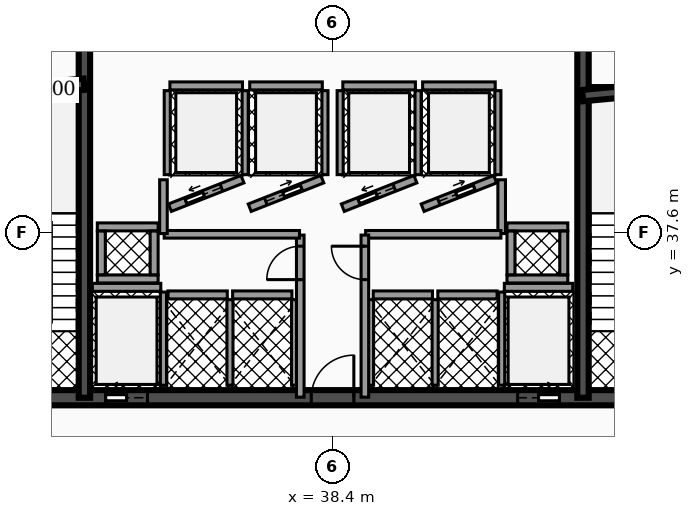
"""IFC4 building model, lengths in metres.
Left out: names, types, materials, properties, quantities, classifications, styles, units other than length and angle.
Written with IfcOpenShell. Run it as: python <this file> out.ifc"""

import sys

from ifc_helpers import new_model, si_unit, direction, frame, frame_2d, origin, place, context, subcontext, project, spatial, rectangle, extrude, element, fill, save


model = new_model("IFC4")
c1 = context("Model", 3, precision=1e-05, world=origin(), true_north=direction((0.0, 1.0)))
c2 = subcontext(c1, "Body", "Model", "MODEL_VIEW")
j1 = project(units=[si_unit("LENGTHUNIT", "METRE"), si_unit("PLANEANGLEUNIT", "RADIAN")], contexts=[c1])
p1 = place(None, origin())
s1 = spatial("IfcSite", under=j1, at=p1, CompositionType="ELEMENT")
p2 = place(p1, origin())
s2 = spatial("IfcBuilding", under=s1, at=p2, CompositionType="ELEMENT")
p3 = place(p2, frame((0.0, 0.0, 60.18)))
s3 = spatial("IfcBuildingStorey", under=s2, at=p3, CompositionType="ELEMENT", Elevation=60.18)
p4 = place(p3, frame((28.4, 33.25, 0.0), z_axis=(0.0, 0.0, 1.0), x_axis=(1.0, 0.0, 0.0)))
e1 = element("IfcWall", 1, at=p4, inside=s3, PredefinedType="SHEAR", context=c2, shape_type="SweptSolid", body=[
    extrude(rectangle(XDim=20.06, YDim=0.4, at=frame_2d((10.03, 0.0))), origin(), (0.0, 0.0, 1.0), 3.82),
])
p5 = place(p4, frame((4.03, 0.0, 0.0)))
e2 = element("IfcOpeningElement", 2, at=p5, cuts=e1, PredefinedType="OPENING", context=c2, shape_type="SweptSolid", body=[
    extrude(rectangle(XDim=1.1, YDim=2.15, at=frame_2d((0.55, 1.075))), frame((0.0, 0.21, 0.0), z_axis=(0.0, -1.0, 0.0), x_axis=(1.0, 0.0, 0.0)), (0.0, 0.0, 1.0), 0.42),
])
p6 = place(p4, frame((14.87, 0.0, 0.0)))
e3 = element("IfcOpeningElement", 3, at=p6, cuts=e1, PredefinedType="OPENING", context=c2, shape_type="SweptSolid", body=[
    extrude(rectangle(XDim=1.1, YDim=2.15, at=frame_2d((0.55, 1.075))), frame((0.0, 0.21, 0.0), z_axis=(0.0, -1.0, 0.0), x_axis=(1.0, 0.0, 0.0)), (0.0, 0.0, 1.0), 0.42),
])
p7 = place(p4, frame((1.31, 0.0, 0.0)))
e4 = element("IfcOpeningElement", 4, at=p7, cuts=e1, PredefinedType="OPENING", context=c2, shape_type="SweptSolid", body=[
    extrude(rectangle(XDim=1.1, YDim=2.2, at=frame_2d((0.55, 1.1))), frame((0.0, 0.21, 0.0), z_axis=(0.0, -1.0, 0.0), x_axis=(1.0, 0.0, 0.0)), (0.0, 0.0, 1.0), 0.42),
])
p8 = place(p4, frame((9.44, 0.0, 0.0)))
e5 = element("IfcOpeningElement", 5, at=p8, cuts=e1, PredefinedType="OPENING", context=c2, shape_type="SweptSolid", body=[
    extrude(rectangle(XDim=1.12, YDim=2.05, at=frame_2d((0.56, 1.025))), frame((0.0, 0.21, 0.0), z_axis=(0.0, -1.0, 0.0), x_axis=(1.0, 0.0, 0.0)), (0.0, 0.0, 1.0), 0.42),
])
p9 = place(p4, frame((17.65, 0.0, 0.0)))
e6 = element("IfcOpeningElement", 6, at=p9, cuts=e1, PredefinedType="OPENING", context=c2, shape_type="SweptSolid", body=[
    extrude(rectangle(XDim=1.1, YDim=2.2, at=frame_2d((0.55, 1.1))), frame((0.0, 0.21, 0.0), z_axis=(0.0, -1.0, 0.0), x_axis=(1.0, 0.0, 0.0)), (0.0, 0.0, 1.0), 0.42),
])
for number, where, z_axis, x_axis in (
    (7, (31.87, 33.25, 0.0), (0.0, 0.0, 1.0), (0.0, 1.0, 0.0)),
    (8, (44.99, 33.25, 0.0), (0.0, 0.0, 1.0), (0.0, 1.0, 0.0)),
):
    element("IfcWall", number, at=place(p3, frame(where, z_axis=z_axis, x_axis=x_axis)), inside=s3, PredefinedType="SHEAR", context=c2, shape_type="SweptSolid", body=[
        extrude(rectangle(XDim=10.2, YDim=0.3, at=frame_2d((5.1, 0.0))), origin(), (0.0, 0.0, 1.0), 3.82),
    ])
p10 = place(p3, frame((28.64, 41.2, 0.0), z_axis=(0.0, 0.0, 1.0), x_axis=(0.995687118776, 0.092774789157, 0.0)))
e9 = element("IfcWall", 9, at=p10, inside=s3, PredefinedType="SHEAR", context=c2, shape_type="SweptSolid", body=[
    extrude(rectangle(XDim=3.234, YDim=0.3, at=frame_2d((1.617, 0.0))), origin(), (0.0, 0.0, 1.0), 3.82),
])
p11 = place(p3, frame((44.98, 41.2, 0.0), z_axis=(0.0, 0.0, 1.0), x_axis=(0.995686468965, 0.09278176286, 0.0)))
e10 = element("IfcWall", 10, at=p11, inside=s3, PredefinedType="SHEAR", context=c2, shape_type="SweptSolid", body=[
    extrude(rectangle(XDim=3.234, YDim=0.3, at=frame_2d((1.617, 0.0))), origin(), (0.0, 0.0, 1.0), 3.82),
])
p12 = place(p3, frame((32.08, 36.155, 0.0), z_axis=(0.0, 0.0, 1.0), x_axis=(1.0, 0.0, 0.0)))
e11 = element("IfcWall", 11, at=p12, inside=s3, PredefinedType="SOLIDWALL", context=c2, shape_type="SweptSolid", body=[
    extrude(rectangle(XDim=1.8, YDim=0.21, at=frame_2d((0.9, 0.0))), origin(), (0.0, 0.0, 1.0), 2.792),
])
p13 = place(p3, frame((33.95, 33.58, 0.0), z_axis=(0.0, 0.0, 1.0), x_axis=(0.0, 1.0, 0.0)))
e12 = element("IfcWall", 12, at=p13, inside=s3, PredefinedType="SOLIDWALL", context=c2, shape_type="SweptSolid", body=[
    extrude(rectangle(XDim=2.45, YDim=0.16, at=frame_2d((1.225, 0.0))), origin(), (0.0, 0.0, 1.0), 2.792),
])
p14 = place(p3, frame((42.92, 36.155, 0.0), z_axis=(0.0, 0.0, 1.0), x_axis=(1.0, 0.0, 0.0)))
e13 = element("IfcWall", 13, at=p14, inside=s3, PredefinedType="SOLIDWALL", context=c2, shape_type="SweptSolid", body=[
    extrude(rectangle(XDim=1.8, YDim=0.21, at=frame_2d((0.9, 0.0))), origin(), (0.0, 0.0, 1.0), 2.792),
])
p15 = place(p3, frame((42.85, 33.58, 0.0), z_axis=(0.0, 0.0, 1.0), x_axis=(0.0, 1.0, 0.0)))
e14 = element("IfcWall", 14, at=p15, inside=s3, PredefinedType="SOLIDWALL", context=c2, shape_type="SweptSolid", body=[
    extrude(rectangle(XDim=2.45, YDim=0.16, at=frame_2d((1.225, 0.0))), origin(), (0.0, 0.0, 1.0), 2.792),
])
p16 = place(p3, frame((34.12, 38.25, 0.0), z_axis=(0.0, 0.0, 1.0), x_axis=(0.930804993012, 0.36551616241, 0.0)))
e15 = element("IfcWall", 15, at=p16, inside=s3, PredefinedType="SOLIDWALL", context=c2, shape_type="SweptSolid", body=[
    extrude(rectangle(XDim=2.052, YDim=0.21, at=frame_2d((1.026, 0.0))), origin(), (0.0, 0.0, 1.0), 2.792),
])
p17 = place(p16, frame((0.455, 0.0, 0.0)))
e16 = element("IfcOpeningElement", 16, at=p17, cuts=e15, PredefinedType="OPENING", context=c2, shape_type="SweptSolid", body=[
    extrude(rectangle(XDim=1.0, YDim=2.1, at=frame_2d((0.5, 1.05))), frame((0.0, 0.115, 0.0), z_axis=(0.0, -1.0, 0.0), x_axis=(1.0, 0.0, 0.0)), (0.0, 0.0, 1.0), 0.23),
])
p18 = place(p3, frame((34.12, 41.455, 0.0), z_axis=(0.0, 0.0, 1.0), x_axis=(1.0, 0.0, 0.0)))
e17 = element("IfcWall", 17, at=p18, inside=s3, PredefinedType="SOLIDWALL", context=c2, shape_type="SweptSolid", body=[
    extrude(rectangle(XDim=1.91, YDim=0.21, at=frame_2d((0.955, 0.0))), origin(), (0.0, 0.0, 1.0), 2.792),
])
for number, where, z_axis, x_axis in (
    (18, (34.05, 39.12, 0.0), (0.0, 0.0, 1.0), (0.0, 1.0, 0.0)),
    (19, (36.1, 39.12, 0.0), (0.0, 0.0, 1.0), (0.0, 1.0, 0.0)),
):
    element("IfcWall", number, at=place(p3, frame(where, z_axis=z_axis, x_axis=x_axis)), inside=s3, PredefinedType="SOLIDWALL", context=c2, shape_type="SweptSolid", body=[
        extrude(rectangle(XDim=2.21, YDim=0.16, at=frame_2d((1.105, 0.0))), origin(), (0.0, 0.0, 1.0), 2.792),
    ])
p19 = place(p3, frame((36.22, 38.25, 0.0), z_axis=(0.0, 0.0, 1.0), x_axis=(0.930804993012, 0.36551616241, 0.0)))
e20 = element("IfcWall", 20, at=p19, inside=s3, PredefinedType="SOLIDWALL", context=c2, shape_type="SweptSolid", body=[
    extrude(rectangle(XDim=2.052, YDim=0.21, at=frame_2d((1.026, 0.0))), origin(), (0.0, 0.0, 1.0), 2.792),
])
p20 = place(p19, frame((0.455, 0.0, 0.0)))
e21 = element("IfcOpeningElement", 21, at=p20, cuts=e20, PredefinedType="OPENING", context=c2, shape_type="SweptSolid", body=[
    extrude(rectangle(XDim=1.0, YDim=2.1, at=frame_2d((0.5, 1.05))), frame((0.0, 0.115, 0.0), z_axis=(0.0, -1.0, 0.0), x_axis=(1.0, 0.0, 0.0)), (0.0, 0.0, 1.0), 0.23),
])
p21 = place(p3, frame((36.22, 41.455, 0.0), z_axis=(0.0, 0.0, 1.0), x_axis=(1.0, 0.0, 0.0)))
e22 = element("IfcWall", 22, at=p21, inside=s3, PredefinedType="SOLIDWALL", context=c2, shape_type="SweptSolid", body=[
    extrude(rectangle(XDim=1.91, YDim=0.21, at=frame_2d((0.955, 0.0))), origin(), (0.0, 0.0, 1.0), 2.792),
])
p22 = place(p3, frame((38.2, 39.12, 0.0), z_axis=(0.0, 0.0, 1.0), x_axis=(0.0, 1.0, 0.0)))
e23 = element("IfcWall", 23, at=p22, inside=s3, PredefinedType="SOLIDWALL", context=c2, shape_type="SweptSolid", body=[
    extrude(rectangle(XDim=2.21, YDim=0.16, at=frame_2d((1.105, 0.0))), origin(), (0.0, 0.0, 1.0), 2.792),
])
p23 = place(p3, frame((38.67, 38.25, 0.0), z_axis=(0.0, 0.0, 1.0), x_axis=(0.930820886763, 0.3654756856, 0.0)))
e24 = element("IfcWall", 24, at=p23, inside=s3, PredefinedType="SOLIDWALL", context=c2, shape_type="SweptSolid", body=[
    extrude(rectangle(XDim=2.052, YDim=0.21, at=frame_2d((1.026, 0.0))), origin(), (0.0, 0.0, 1.0), 2.792),
])
p24 = place(p23, frame((0.455, 0.0, 0.0)))
e25 = element("IfcOpeningElement", 25, at=p24, cuts=e24, PredefinedType="OPENING", context=c2, shape_type="SweptSolid", body=[
    extrude(rectangle(XDim=1.0, YDim=2.1, at=frame_2d((0.5, 1.05))), frame((0.0, 0.115, 0.0), z_axis=(0.0, -1.0, 0.0), x_axis=(1.0, 0.0, 0.0)), (0.0, 0.0, 1.0), 0.23),
])
p25 = place(p3, frame((38.67, 41.455, 0.0), z_axis=(0.0, 0.0, 1.0), x_axis=(1.0, 0.0, 0.0)))
e26 = element("IfcWall", 26, at=p25, inside=s3, PredefinedType="SOLIDWALL", context=c2, shape_type="SweptSolid", body=[
    extrude(rectangle(XDim=1.91, YDim=0.21, at=frame_2d((0.955, 0.0))), origin(), (0.0, 0.0, 1.0), 2.792),
])
for number, where, z_axis, x_axis in (
    (27, (38.6, 39.12, 0.0), (0.0, 0.0, 1.0), (0.0, 1.0, 0.0)),
    (28, (40.65, 39.12, 0.0), (0.0, 0.0, 1.0), (0.0, 1.0, 0.0)),
):
    element("IfcWall", number, at=place(p3, frame(where, z_axis=z_axis, x_axis=x_axis)), inside=s3, PredefinedType="SOLIDWALL", context=c2, shape_type="SweptSolid", body=[
        extrude(rectangle(XDim=2.21, YDim=0.16, at=frame_2d((1.105, 0.0))), origin(), (0.0, 0.0, 1.0), 2.792),
    ])
p26 = place(p3, frame((40.77, 38.25, 0.0), z_axis=(0.0, 0.0, 1.0), x_axis=(0.930804993012, 0.36551616241, 0.0)))
e29 = element("IfcWall", 29, at=p26, inside=s3, PredefinedType="SOLIDWALL", context=c2, shape_type="SweptSolid", body=[
    extrude(rectangle(XDim=2.052, YDim=0.21, at=frame_2d((1.026, 0.0))), origin(), (0.0, 0.0, 1.0), 2.792),
])
p27 = place(p26, frame((0.455, 0.0, 0.0)))
e30 = element("IfcOpeningElement", 30, at=p27, cuts=e29, PredefinedType="OPENING", context=c2, shape_type="SweptSolid", body=[
    extrude(rectangle(XDim=1.0, YDim=2.1, at=frame_2d((0.5, 1.05))), frame((0.0, 0.115, 0.0), z_axis=(0.0, -1.0, 0.0), x_axis=(1.0, 0.0, 0.0)), (0.0, 0.0, 1.0), 0.23),
])
p28 = place(p3, frame((40.77, 41.455, 0.0), z_axis=(0.0, 0.0, 1.0), x_axis=(1.0, 0.0, 0.0)))
e31 = element("IfcWall", 31, at=p28, inside=s3, PredefinedType="SOLIDWALL", context=c2, shape_type="SweptSolid", body=[
    extrude(rectangle(XDim=1.91, YDim=0.21, at=frame_2d((0.955, 0.0))), origin(), (0.0, 0.0, 1.0), 2.792),
])
p29 = place(p3, frame((42.75, 39.12, 0.0), z_axis=(0.0, 0.0, 1.0), x_axis=(0.0, 1.0, 0.0)))
e32 = element("IfcWall", 32, at=p29, inside=s3, PredefinedType="SOLIDWALL", context=c2, shape_type="SweptSolid", body=[
    extrude(rectangle(XDim=2.21, YDim=0.16, at=frame_2d((1.105, 0.0))), origin(), (0.0, 0.0, 1.0), 2.792),
])
p30 = place(p3, frame((34.07, 35.955, 0.0), z_axis=(0.0, 0.0, 1.0), x_axis=(1.0, 0.0, 0.0)))
e33 = element("IfcWall", 33, at=p30, inside=s3, PredefinedType="SOLIDWALL", context=c2, shape_type="SweptSolid", body=[
    extrude(rectangle(XDim=1.56, YDim=0.21, at=frame_2d((0.78, 0.0))), origin(), (0.0, 0.0, 1.0), 2.792),
])
p31 = place(p3, frame((35.7, 33.58, 0.0), z_axis=(0.0, 0.0, 1.0), x_axis=(0.0, 1.0, 0.0)))
e34 = element("IfcWall", 34, at=p31, inside=s3, PredefinedType="SOLIDWALL", context=c2, shape_type="SweptSolid", body=[
    extrude(rectangle(XDim=2.25, YDim=0.16, at=frame_2d((1.125, 0.0))), origin(), (0.0, 0.0, 1.0), 2.792),
])
p32 = place(p3, frame((35.77, 35.955, 0.0), z_axis=(0.0, 0.0, 1.0), x_axis=(1.0, 0.0, 0.0)))
e35 = element("IfcWall", 35, at=p32, inside=s3, PredefinedType="SOLIDWALL", context=c2, shape_type="SweptSolid", body=[
    extrude(rectangle(XDim=1.56, YDim=0.21, at=frame_2d((0.78, 0.0))), origin(), (0.0, 0.0, 1.0), 2.792),
])
p33 = place(p3, frame((37.4, 33.58, 0.0), z_axis=(0.0, 0.0, 1.0), x_axis=(0.0, 1.0, 0.0)))
e36 = element("IfcWall", 36, at=p33, inside=s3, PredefinedType="SOLIDWALL", context=c2, shape_type="SweptSolid", body=[
    extrude(rectangle(XDim=2.25, YDim=0.16, at=frame_2d((1.125, 0.0))), origin(), (0.0, 0.0, 1.0), 2.792),
])
p34 = place(p3, frame((39.47, 35.955, 0.0), z_axis=(0.0, 0.0, 1.0), x_axis=(1.0, 0.0, 0.0)))
e37 = element("IfcWall", 37, at=p34, inside=s3, PredefinedType="SOLIDWALL", context=c2, shape_type="SweptSolid", body=[
    extrude(rectangle(XDim=1.56, YDim=0.21, at=frame_2d((0.78, 0.0))), origin(), (0.0, 0.0, 1.0), 2.792),
])
for number, where, z_axis, x_axis in (
    (38, (39.4, 33.58, 0.0), (0.0, 0.0, 1.0), (0.0, 1.0, 0.0)),
    (39, (41.1, 33.58, 0.0), (0.0, 0.0, 1.0), (0.0, 1.0, 0.0)),
):
    element("IfcWall", number, at=place(p3, frame(where, z_axis=z_axis, x_axis=x_axis)), inside=s3, PredefinedType="SOLIDWALL", context=c2, shape_type="SweptSolid", body=[
        extrude(rectangle(XDim=2.25, YDim=0.16, at=frame_2d((1.125, 0.0))), origin(), (0.0, 0.0, 1.0), 2.792),
    ])
p35 = place(p3, frame((41.17, 35.955, 0.0), z_axis=(0.0, 0.0, 1.0), x_axis=(1.0, 0.0, 0.0)))
e40 = element("IfcWall", 40, at=p35, inside=s3, PredefinedType="SOLIDWALL", context=c2, shape_type="SweptSolid", body=[
    extrude(rectangle(XDim=1.56, YDim=0.21, at=frame_2d((0.78, 0.0))), origin(), (0.0, 0.0, 1.0), 2.792),
])
for number, where, z_axis, x_axis in (
    (41, (32.21, 36.375, 0.0), (0.0, 0.0, 1.0), (1.0, 0.0, 0.0)),
    (42, (32.21, 37.745, 0.0), (0.0, 0.0, 1.0), (1.0, 0.0, 0.0)),
):
    element("IfcWall", number, at=place(p3, frame(where, z_axis=z_axis, x_axis=x_axis)), inside=s3, PredefinedType="SOLIDWALL", context=c2, shape_type="SweptSolid", body=[
        extrude(rectangle(XDim=1.6, YDim=0.21, at=frame_2d((0.8, 0.0))), origin(), (0.0, 0.0, 1.0), 3.82),
    ])
for number, where, z_axis, x_axis in (
    (43, (32.315, 36.485, 0.0), (0.0, 0.0, 1.0), (0.0, 1.0, 0.0)),
    (44, (33.705, 36.485, 0.0), (0.0, 0.0, 1.0), (0.0, 1.0, 0.0)),
):
    element("IfcWall", number, at=place(p3, frame(where, z_axis=z_axis, x_axis=x_axis)), inside=s3, PredefinedType="SOLIDWALL", context=c2, shape_type="SweptSolid", body=[
        extrude(rectangle(XDim=1.15, YDim=0.21, at=frame_2d((0.575, 0.0))), origin(), (0.0, 0.0, 1.0), 3.82),
    ])
for number, where, z_axis, x_axis in (
    (45, (42.99, 36.375, 0.0), (0.0, 0.0, 1.0), (1.0, 0.0, 0.0)),
    (46, (42.99, 37.745, 0.0), (0.0, 0.0, 1.0), (1.0, 0.0, 0.0)),
):
    element("IfcWall", number, at=place(p3, frame(where, z_axis=z_axis, x_axis=x_axis)), inside=s3, PredefinedType="SOLIDWALL", context=c2, shape_type="SweptSolid", body=[
        extrude(rectangle(XDim=1.6, YDim=0.21, at=frame_2d((0.8, 0.0))), origin(), (0.0, 0.0, 1.0), 3.82),
    ])
for number, where, z_axis, x_axis in (
    (47, (43.095, 36.485, 0.0), (0.0, 0.0, 1.0), (0.0, 1.0, 0.0)),
    (48, (44.485, 36.485, 0.0), (0.0, 0.0, 1.0), (0.0, 1.0, 0.0)),
):
    element("IfcWall", number, at=place(p3, frame(where, z_axis=z_axis, x_axis=x_axis)), inside=s3, PredefinedType="SOLIDWALL", context=c2, shape_type="SweptSolid", body=[
        extrude(rectangle(XDim=1.15, YDim=0.21, at=frame_2d((0.575, 0.0))), origin(), (0.0, 0.0, 1.0), 3.82),
    ])
p36 = place(p3, frame((37.55, 33.265, 0.0), z_axis=(0.0, 0.0, 1.0), x_axis=(0.0, 1.0, 0.0)))
e49 = element("IfcWall", 49, at=p36, inside=s3, PredefinedType="PARTITIONING", context=c2, shape_type="SweptSolid", body=[
    extrude(rectangle(XDim=4.265, YDim=0.2, at=frame_2d((2.133, 0.0))), origin(), (0.0, 0.0, 1.0), 2.777),
])
p37 = place(p36, frame((3.093, 0.0, 0.0)))
e50 = element("IfcOpeningElement", 50, at=p37, cuts=e49, PredefinedType="OPENING", context=c2, shape_type="SweptSolid", body=[
    extrude(rectangle(XDim=0.88, YDim=2.05, at=frame_2d((0.44, 1.025))), frame((0.0, 0.11, 0.0), z_axis=(0.0, -1.0, 0.0), x_axis=(1.0, 0.0, 0.0)), (0.0, 0.0, 1.0), 0.22),
])
p38 = place(p3, frame((33.97, 37.55, 0.0), z_axis=(0.0, 0.0, 1.0), x_axis=(1.0, 0.0, 0.0)))
e51 = element("IfcWall", 51, at=p38, inside=s3, PredefinedType="PARTITIONING", context=c2, shape_type="SweptSolid", body=[
    extrude(rectangle(XDim=3.56, YDim=0.2, at=frame_2d((1.78, 0.0))), origin(), (0.0, 0.0, 1.0), 2.777),
])
for number, where, z_axis, x_axis in (
    (52, (33.95, 37.57, 0.0), (0.0, 0.0, 1.0), (0.0, 1.0, 0.0)),
    (53, (42.85, 37.57, 0.0), (0.0, 0.0, 1.0), (0.0, 1.0, 0.0)),
):
    element("IfcWall", number, at=place(p3, frame(where, z_axis=z_axis, x_axis=x_axis)), inside=s3, PredefinedType="PARTITIONING", context=c2, shape_type="SweptSolid", body=[
        extrude(rectangle(XDim=1.415, YDim=0.2, at=frame_2d((0.708, 0.0))), origin(), (0.0, 0.0, 1.0), 2.777),
    ])
p39 = place(p3, frame((39.27, 37.55, 0.0), z_axis=(0.0, 0.0, 1.0), x_axis=(1.0, 0.0, 0.0)))
e54 = element("IfcWall", 54, at=p39, inside=s3, PredefinedType="PARTITIONING", context=c2, shape_type="SweptSolid", body=[
    extrude(rectangle(XDim=3.56, YDim=0.2, at=frame_2d((1.78, 0.0))), origin(), (0.0, 0.0, 1.0), 2.777),
])
p40 = place(p3, frame((39.25, 33.265, 0.0), z_axis=(0.0, 0.0, 1.0), x_axis=(0.0, 1.0, 0.0)))
e55 = element("IfcWall", 55, at=p40, inside=s3, PredefinedType="PARTITIONING", context=c2, shape_type="SweptSolid", body=[
    extrude(rectangle(XDim=4.265, YDim=0.2, at=frame_2d((2.133, 0.0))), origin(), (0.0, 0.0, 1.0), 2.777),
])
p41 = place(p40, frame((3.093, 0.0, 0.0)))
e56 = element("IfcOpeningElement", 56, at=p41, cuts=e55, PredefinedType="OPENING", context=c2, shape_type="SweptSolid", body=[
    extrude(rectangle(XDim=0.88, YDim=2.05, at=frame_2d((0.44, 1.025))), frame((0.0, 0.11, 0.0), z_axis=(0.0, -1.0, 0.0), x_axis=(1.0, 0.0, 0.0)), (0.0, 0.0, 1.0), 0.22),
])
p42 = place(p5, origin())
e57 = element("IfcDoor", 57, at=p42, inside=s3, OperationType="SLIDING_TO_LEFT", PredefinedType="DOOR", context=c2, shape_type="SweptSolid", body=[
    extrude(rectangle(XDim=1.1, YDim=2.15, at=frame_2d((0.55, 1.075))), frame((0.0, 0.025, 0.0), z_axis=(0.0, -1.0, 0.0), x_axis=(1.0, 0.0, 0.0)), (0.0, 0.0, 1.0), 0.05),
])
fill(e2, e57)
p43 = place(p6, origin())
e58 = element("IfcDoor", 58, at=p43, inside=s3, OperationType="SLIDING_TO_RIGHT", PredefinedType="DOOR", context=c2, shape_type="SweptSolid", body=[
    extrude(rectangle(XDim=1.1, YDim=2.15, at=frame_2d((0.55, 1.075))), frame((0.0, 0.025, 0.0), z_axis=(0.0, -1.0, 0.0), x_axis=(1.0, 0.0, 0.0)), (0.0, 0.0, 1.0), 0.05),
])
fill(e3, e58)
p44 = place(p17, origin())
e59 = element("IfcDoor", 59, at=p44, inside=s3, OperationType="SLIDING_TO_LEFT", PredefinedType="DOOR", context=c2, shape_type="SweptSolid", body=[
    extrude(rectangle(XDim=1.0, YDim=2.1, at=frame_2d((0.5, 1.05))), frame((0.0, 0.025, 0.0), z_axis=(0.0, -1.0, 0.0), x_axis=(1.0, 0.0, 0.0)), (0.0, 0.0, 1.0), 0.05),
])
fill(e16, e59)
p45 = place(p20, origin())
e60 = element("IfcDoor", 60, at=p45, inside=s3, OperationType="SLIDING_TO_RIGHT", PredefinedType="DOOR", context=c2, shape_type="SweptSolid", body=[
    extrude(rectangle(XDim=1.0, YDim=2.1, at=frame_2d((0.5, 1.05))), frame((0.0, 0.025, 0.0), z_axis=(0.0, -1.0, 0.0), x_axis=(1.0, 0.0, 0.0)), (0.0, 0.0, 1.0), 0.05),
])
fill(e21, e60)
p46 = place(p24, origin())
e61 = element("IfcDoor", 61, at=p46, inside=s3, OperationType="SLIDING_TO_LEFT", PredefinedType="DOOR", context=c2, shape_type="SweptSolid", body=[
    extrude(rectangle(XDim=1.0, YDim=2.1, at=frame_2d((0.5, 1.05))), frame((0.0, 0.025, 0.0), z_axis=(0.0, -1.0, 0.0), x_axis=(1.0, 0.0, 0.0)), (0.0, 0.0, 1.0), 0.05),
])
fill(e25, e61)
p47 = place(p27, origin())
e62 = element("IfcDoor", 62, at=p47, inside=s3, OperationType="SLIDING_TO_RIGHT", PredefinedType="DOOR", context=c2, shape_type="SweptSolid", body=[
    extrude(rectangle(XDim=1.0, YDim=2.1, at=frame_2d((0.5, 1.05))), frame((0.0, 0.025, 0.0), z_axis=(0.0, -1.0, 0.0), x_axis=(1.0, 0.0, 0.0)), (0.0, 0.0, 1.0), 0.05),
])
fill(e30, e62)
p48 = place(p8, origin())
e63 = element("IfcDoor", 63, at=p48, inside=s3, OperationType="SINGLE_SWING_RIGHT", PredefinedType="DOOR", context=c2, shape_type="SweptSolid", body=[
    extrude(rectangle(XDim=1.12, YDim=2.05, at=frame_2d((0.56, 1.025))), frame((0.0, 0.025, 0.0), z_axis=(0.0, -1.0, 0.0), x_axis=(1.0, 0.0, 0.0)), (0.0, 0.0, 1.0), 0.05),
])
fill(e5, e63)
p49 = place(p37, origin())
e64 = element("IfcDoor", 64, at=p49, inside=s3, OperationType="SINGLE_SWING_LEFT", PredefinedType="DOOR", context=c2, shape_type="SweptSolid", body=[
    extrude(rectangle(XDim=0.88, YDim=2.05, at=frame_2d((0.44, 1.025))), frame((0.0, 0.025, 0.0), z_axis=(0.0, -1.0, 0.0), x_axis=(1.0, 0.0, 0.0)), (0.0, 0.0, 1.0), 0.05),
])
fill(e50, e64)
p50 = place(p41, origin())
e65 = element("IfcDoor", 65, at=p50, inside=s3, OperationType="SINGLE_SWING_RIGHT", PredefinedType="DOOR", context=c2, shape_type="SweptSolid", body=[
    extrude(rectangle(XDim=0.88, YDim=2.05, at=frame_2d((0.44, 1.025))), frame((0.0, 0.025, 0.0), z_axis=(0.0, -1.0, 0.0), x_axis=(1.0, 0.0, 0.0)), (0.0, 0.0, 1.0), 0.05),
])
fill(e56, e65)
save(model, sys.argv[1])
